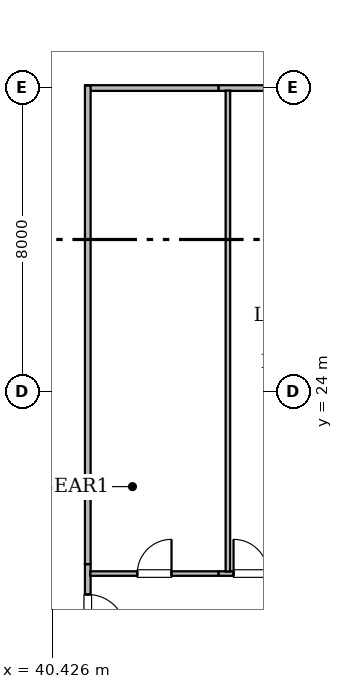
"""IFC4 building model, lengths in metres.
Left out: names, types, materials, properties, quantities, classifications, styles, units other than length and angle.
Written with IfcOpenShell. Run it as: python <this file> out.ifc"""

import sys

from ifc_helpers import new_model, si_unit, direction, frame, frame_2d, origin, place, context, subcontext, project, spatial, rectangle, extrude, element, fill, save


model = new_model("IFC4")
c1 = context("Model", 3, precision=1e-05, world=origin(), true_north=direction((0.0, 1.0)))
c2 = subcontext(c1, "Body", "Model", "MODEL_VIEW")
j1 = project(units=[si_unit("LENGTHUNIT", "METRE"), si_unit("PLANEANGLEUNIT", "RADIAN")], contexts=[c1])
p1 = place(None, origin())
s1 = spatial("IfcSite", under=j1, at=p1, CompositionType="ELEMENT")
p2 = place(p1, origin())
s2 = spatial("IfcBuilding", under=s1, at=p2, CompositionType="ELEMENT")
p3 = place(p2, frame((0.0, 0.0, 105.55)))
s3 = spatial("IfcBuildingStorey", under=s2, at=p3, CompositionType="ELEMENT", Elevation=105.55)
p4 = place(p3, frame((41.365, 19.459, 0.0), z_axis=(0.0, 0.0, 1.0), x_axis=(0.0, -1.0, 0.0)))
e1 = element("IfcWall", 1, at=p4, inside=s3, PredefinedType="STANDARD", context=c2, shape_type="SweptSolid", body=[
    extrude(rectangle(XDim=2.559, YDim=0.15, at=frame_2d((1.28, 0.0))), origin(), (0.0, 0.0, 1.0), 2.647),
])
p5 = place(p4, frame((0.8, 0.0, 0.0)))
e2 = element("IfcOpeningElement", 2, at=p5, cuts=e1, PredefinedType="OPENING", context=c2, shape_type="SweptSolid", body=[
    extrude(rectangle(XDim=1.0, YDim=2.15, at=frame_2d((0.5, 1.075))), frame((0.0, 0.085, 0.0), z_axis=(0.0, -1.0, 0.0), x_axis=(1.0, 0.0, 0.0)), (0.0, 0.0, 1.0), 0.17),
])
p6 = place(p3, frame((48.709, 31.985, 0.0), z_axis=(0.0, 0.0, 1.0), x_axis=(-1.0, 0.0, 0.0)))
e3 = element("IfcWall", 3, at=p6, inside=s3, PredefinedType="STANDARD", context=c2, shape_type="SweptSolid", body=[
    extrude(rectangle(XDim=3.906, YDim=0.15, at=frame_2d((1.953, 0.0))), origin(), (0.0, 0.0, 1.0), 2.647),
])
p7 = place(p3, frame((44.803, 31.985, 0.0), z_axis=(0.0, 0.0, 1.0), x_axis=(-1.0, 0.0, 0.0)))
e4 = element("IfcWall", 4, at=p7, inside=s3, PredefinedType="STANDARD", context=c2, shape_type="SweptSolid", body=[
    extrude(rectangle(XDim=3.503, YDim=0.15, at=frame_2d((1.751, 0.0))), origin(), (0.0, 0.0, 1.0), 3.43),
])
p8 = place(p3, frame((41.365, 32.048, 0.0), z_axis=(0.0, 0.0, 1.0), x_axis=(0.0, -1.0, 0.0)))
e5 = element("IfcWall", 5, at=p8, inside=s3, PredefinedType="STANDARD", context=c2, shape_type="SweptSolid", body=[
    extrude(rectangle(XDim=12.589, YDim=0.15, at=frame_2d((6.294, 0.0))), origin(), (0.0, 0.0, 1.0), 2.961),
])
p9 = place(p3, frame((44.803, 19.21, 0.0), z_axis=(0.0, 0.0, 1.0), x_axis=(1.0, 0.0, 0.0)))
e6 = element("IfcWall", 6, at=p9, inside=s3, PredefinedType="PARTITIONING", context=c2, shape_type="SweptSolid", body=[
    extrude(rectangle(XDim=3.592, YDim=0.12, at=frame_2d((1.796, 0.0))), origin(), (0.0, 0.0, 1.0), 2.647),
])
p10 = place(p9, frame((0.397, 0.0, 0.0)))
e7 = element("IfcOpeningElement", 7, at=p10, cuts=e6, PredefinedType="OPENING", context=c2, shape_type="SweptSolid", body=[
    extrude(rectangle(XDim=0.9, YDim=2.1, at=frame_2d((0.45, 1.05))), frame((0.0, 0.07, 0.0), z_axis=(0.0, -1.0, 0.0), x_axis=(1.0, 0.0, 0.0)), (0.0, 0.0, 1.0), 0.14),
])
p11 = place(p3, frame((41.432, 19.21, 0.0), z_axis=(0.0, 0.0, 1.0), x_axis=(1.0, 0.0, 0.0)))
e8 = element("IfcWall", 8, at=p11, inside=s3, PredefinedType="PARTITIONING", context=c2, shape_type="SweptSolid", body=[
    extrude(rectangle(XDim=3.371, YDim=0.12, at=frame_2d((1.686, 0.0))), origin(), (0.0, 0.0, 1.0), 3.43),
])
p12 = place(p11, frame((1.236, 0.0, 0.0)))
e9 = element("IfcOpeningElement", 9, at=p12, cuts=e8, PredefinedType="OPENING", context=c2, shape_type="SweptSolid", body=[
    extrude(rectangle(XDim=0.9, YDim=2.1, at=frame_2d((0.45, 1.05))), frame((0.0, 0.07, 0.0), z_axis=(0.0, -1.0, 0.0), x_axis=(1.0, 0.0, 0.0)), (0.0, 0.0, 1.0), 0.14),
])
p13 = place(p3, frame((45.052, 19.264, 0.0), z_axis=(0.0, 0.0, 1.0), x_axis=(0.0, 1.0, 0.0)))
e10 = element("IfcWall", 10, at=p13, inside=s3, PredefinedType="PARTITIONING", context=c2, shape_type="SweptSolid", body=[
    extrude(rectangle(XDim=12.654, YDim=0.12, at=frame_2d((6.327, 0.0))), origin(), (0.0, 0.0, 1.0), 2.961),
])
p14 = place(p5, origin())
e11 = element("IfcDoor", 11, at=p14, inside=s3, OperationType="SINGLE_SWING_RIGHT", PredefinedType="DOOR", context=c2, shape_type="SweptSolid", body=[
    extrude(rectangle(XDim=1.0, YDim=2.15, at=frame_2d((0.5, 1.075))), frame((0.0, 0.025, 0.0), z_axis=(0.0, -1.0, 0.0), x_axis=(1.0, 0.0, 0.0)), (0.0, 0.0, 1.0), 0.05),
])
fill(e2, e11)
p15 = place(p10, origin())
e12 = element("IfcDoor", 12, at=p15, inside=s3, OperationType="SINGLE_SWING_LEFT", PredefinedType="DOOR", context=c2, shape_type="SweptSolid", body=[
    extrude(rectangle(XDim=0.9, YDim=2.1, at=frame_2d((0.45, 1.05))), frame((0.0, 0.025, 0.0), z_axis=(0.0, -1.0, 0.0), x_axis=(1.0, 0.0, 0.0)), (0.0, 0.0, 1.0), 0.05),
])
fill(e7, e12)
p16 = place(p12, origin())
e13 = element("IfcDoor", 13, at=p16, inside=s3, OperationType="SINGLE_SWING_RIGHT", PredefinedType="DOOR", context=c2, shape_type="SweptSolid", body=[
    extrude(rectangle(XDim=0.9, YDim=2.1, at=frame_2d((0.45, 1.05))), frame((0.0, 0.025, 0.0), z_axis=(0.0, -1.0, 0.0), x_axis=(1.0, 0.0, 0.0)), (0.0, 0.0, 1.0), 0.05),
])
fill(e9, e13)
save(model, sys.argv[1])
